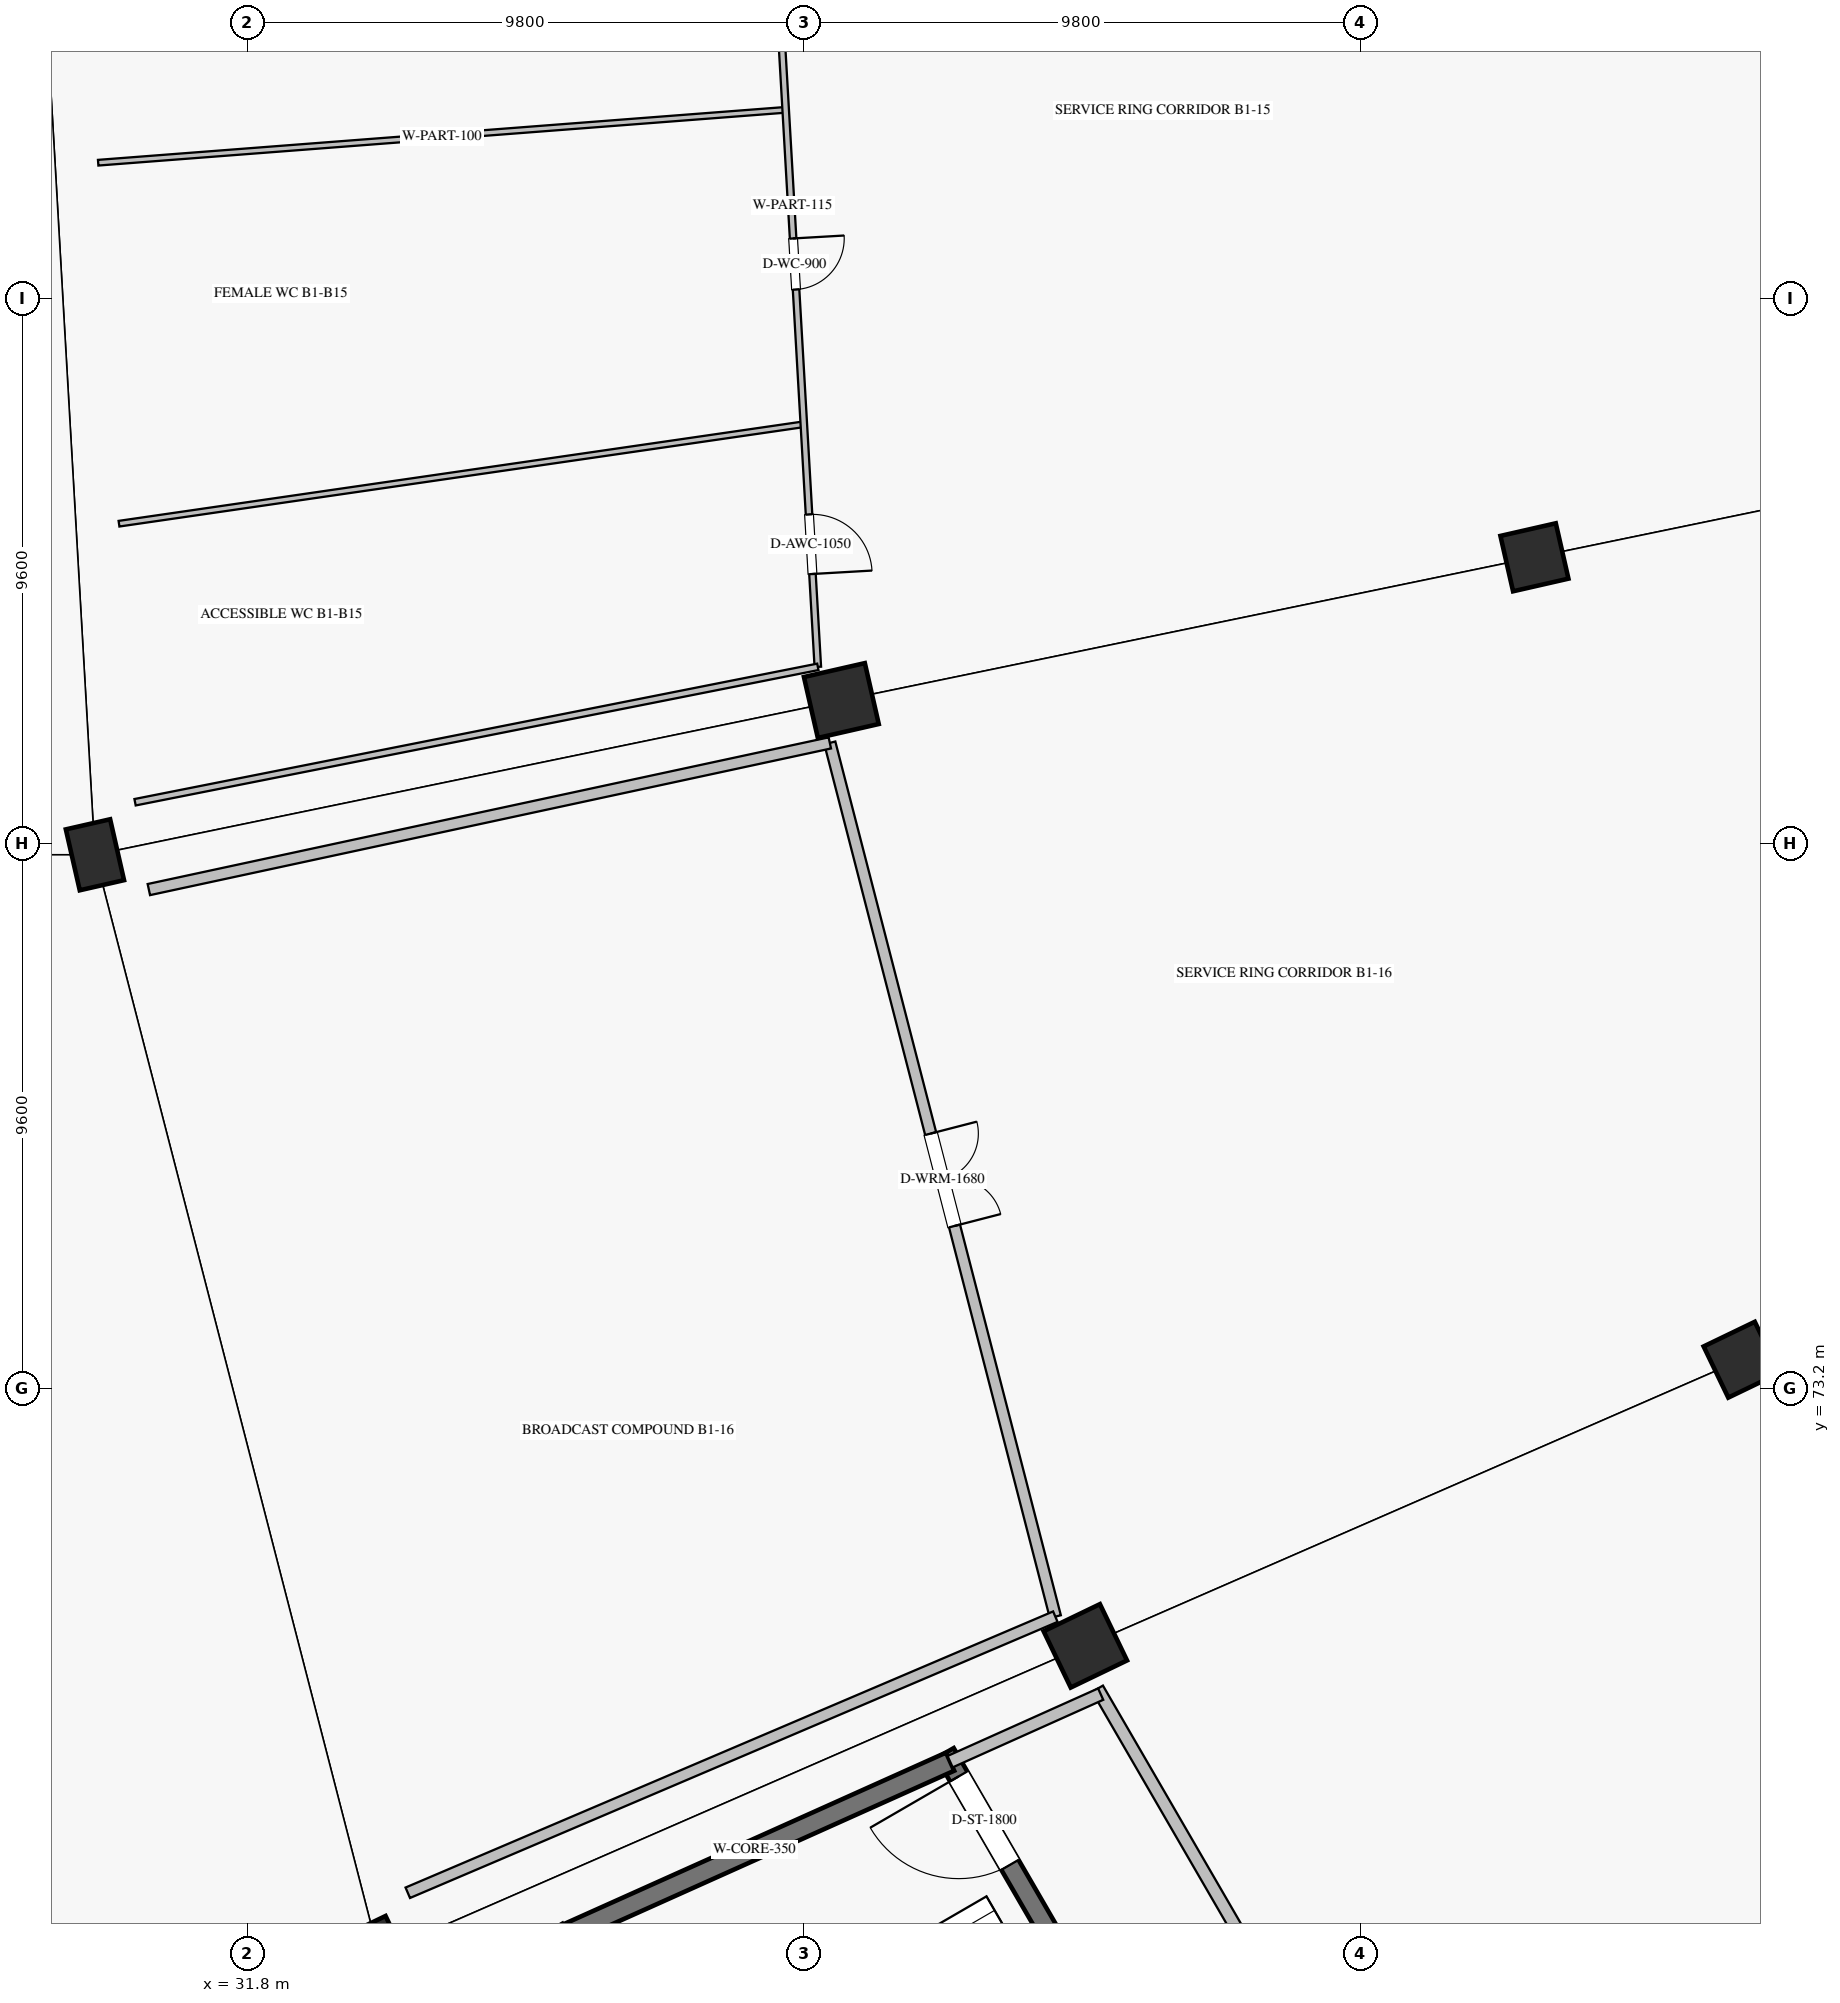
"""IFC4 building model, lengths in metres.
Left out: names, types, materials, properties, quantities, classifications, styles, units other than length and angle.
Written with IfcOpenShell. Run it as: python <this file> out.ifc"""

import sys

from ifc_helpers import new_model, si_unit, direction, frame, frame_2d, origin, origin_2d, place, context, subcontext, project, spatial, rectangle, extrude, element, fill, save


model = new_model("IFC4")
c1 = context("Model", 3, precision=1e-05, world=origin(), true_north=direction((0.0, 1.0)))
c2 = subcontext(c1, "Body", "Model", "MODEL_VIEW")
j1 = project(units=[si_unit("LENGTHUNIT", "METRE"), si_unit("PLANEANGLEUNIT", "RADIAN")], contexts=[c1])
p1 = place(None, origin())
s1 = spatial("IfcSite", under=j1, at=p1, CompositionType="ELEMENT")
p2 = place(p1, origin())
s2 = spatial("IfcBuilding", under=s1, at=p2, CompositionType="ELEMENT")
p3 = place(p2, frame((0.0, 0.0, -5.44)))
s3 = spatial("IfcBuildingStorey", under=s2, at=p3, CompositionType="ELEMENT", Elevation=-5.44)
for number, where, z_axis, x_axis in (
    (1, (54.467, 87.84, 0.0), (0.0, 0.0, 1.0), (-0.975, -0.223, 0.0)),
    (2, (58.114, 73.713, 0.0), (0.0, 0.0, 1.0), (-0.901, -0.434, 0.0)),
):
    element("IfcColumn", number, at=place(p3, frame(where, z_axis=z_axis, x_axis=x_axis)), inside=s3, PredefinedType="COLUMN", context=c2, shape_type="SweptSolid", body=[
        extrude(rectangle(XDim=1.0, YDim=1.0, at=origin_2d()), origin(), (0.0, 0.0, 1.0), 5.44),
    ])
for number, where, z_axis, x_axis in (
    (3, (42.262, 85.318, 0.0), (0.0, 0.0, 1.0), (-0.975, -0.223, 0.0)),
    (4, (46.559, 68.675, 0.0), (0.0, 0.0, 1.0), (-0.901, -0.434, 0.0)),
):
    element("IfcColumn", number, at=place(p3, frame(where, z_axis=z_axis, x_axis=x_axis)), inside=s3, PredefinedType="COLUMN", context=c2, shape_type="SweptSolid", body=[
        extrude(rectangle(XDim=1.1, YDim=1.1, at=origin_2d()), origin(), (0.0, 0.0, 1.0), 5.44),
    ])
for number, where, z_axis, x_axis in (
    (5, (29.119, 82.602, 0.0), (0.0, 0.0, 1.0), (-0.975, -0.223, 0.0)),
    (6, (34.115, 63.25, 0.0), (0.0, 0.0, 1.0), (-0.901, -0.434, 0.0)),
):
    element("IfcColumn", number, at=place(p3, frame(where, z_axis=z_axis, x_axis=x_axis)), inside=s3, PredefinedType="COLUMN", context=c2, shape_type="SweptSolid", body=[
        extrude(rectangle(XDim=0.8, YDim=1.1, at=origin_2d()), origin(), (0.0, 0.0, 1.0), 5.44),
    ])
p4 = place(p3, frame((44.09, 66.788, 0.0), z_axis=(0.0, 0.0, 1.0), x_axis=(0.501628624814, -0.865083072755, 0.0)))
e7 = element("IfcWall", 7, at=p4, inside=s3, PredefinedType="SHEAR", context=c2, shape_type="SweptSolid", body=[
    extrude(rectangle(XDim=11.435, YDim=0.35, at=frame_2d((5.718, 0.0))), origin(), (0.0, 0.0, 1.0), 5.14),
])
p5 = place(p4, frame((0.475, 0.0, 0.0)))
e8 = element("IfcOpeningElement", 8, at=p5, cuts=e7, PredefinedType="OPENING", context=c2, shape_type="SweptSolid", body=[
    extrude(rectangle(XDim=1.8, YDim=2.2, at=frame_2d((0.9, 1.1))), frame((0.0, 0.185, 0.0), z_axis=(0.0, -1.0, 0.0), x_axis=(1.0, 0.0, 0.0)), (0.0, 0.0, 1.0), 0.37),
])
p6 = place(p3, frame((44.178, 66.636, 0.0), z_axis=(0.0, 0.0, 1.0), x_axis=(-0.912385324524, -0.409332407212, 0.0)))
e9 = element("IfcWall", 9, at=p6, inside=s3, PredefinedType="SHEAR", context=c2, shape_type="SweptSolid", body=[
    extrude(rectangle(XDim=7.554, YDim=0.35, at=frame_2d((3.777, 0.0))), origin(), (0.0, 0.0, 1.0), 5.14),
])
p7 = place(p3, frame((46.774, 67.921, 0.0), z_axis=(0.0, 0.0, 1.0), x_axis=(0.501612626242, -0.865092349518, 0.0)))
e10 = element("IfcWall", 10, at=p7, inside=s3, PredefinedType="SOLIDWALL", context=c2, shape_type="SweptSolid", body=[
    extrude(rectangle(XDim=16.11, YDim=0.22, at=frame_2d((8.055, 0.0))), origin(), (0.0, 0.0, 1.0), 4.088),
])
p8 = place(p7, frame((6.511, 0.0, 0.0)))
e11 = element("IfcOpeningElement", 11, at=p8, cuts=e10, PredefinedType="OPENING", context=c2, shape_type="SweptSolid", body=[
    extrude(rectangle(XDim=1.5, YDim=2.2, at=frame_2d((0.75, 1.1))), frame((0.0, 0.12, 0.0), z_axis=(0.0, -1.0, 0.0), x_axis=(1.0, 0.0, 0.0)), (0.0, 0.0, 1.0), 0.24),
])
p9 = place(p3, frame((46.829, 67.826, 0.0), z_axis=(0.0, 0.0, 1.0), x_axis=(-0.912378422162, -0.409347791949, 0.0)))
e12 = element("IfcWall", 12, at=p9, inside=s3, PredefinedType="SOLIDWALL", context=c2, shape_type="SweptSolid", body=[
    extrude(rectangle(XDim=2.906, YDim=0.22, at=frame_2d((1.453, 0.0))), origin(), (0.0, 0.0, 1.0), 5.14),
])
p10 = place(p3, frame((40.959, 101.33, 0.0), z_axis=(0.0, 0.0, 1.0), x_axis=(0.057603503798, -0.998339539611, 0.0)))
e13 = element("IfcWall", 13, at=p10, inside=s3, PredefinedType="PARTITIONING", context=c2, shape_type="SweptSolid", body=[
    extrude(rectangle(XDim=15.444, YDim=0.115, at=frame_2d((7.722, 0.0))), origin(), (0.0, 0.0, 1.0), 4.46),
])
p11 = place(p10, frame((2.33, 0.0, 0.0)))
e14 = element("IfcOpeningElement", 14, at=p11, cuts=e13, PredefinedType="OPENING", context=c2, shape_type="SweptSolid", body=[
    extrude(rectangle(XDim=0.9, YDim=2.1, at=frame_2d((0.45, 1.05))), frame((0.0, 0.067, 0.0), z_axis=(0.0, -1.0, 0.0), x_axis=(1.0, 0.0, 0.0)), (0.0, 0.0, 1.0), 0.135),
])
p12 = place(p10, frame((7.89, 0.0, 0.0)))
e15 = element("IfcOpeningElement", 15, at=p12, cuts=e13, PredefinedType="OPENING", context=c2, shape_type="SweptSolid", body=[
    extrude(rectangle(XDim=0.9, YDim=2.1, at=frame_2d((0.45, 1.05))), frame((0.0, 0.067, 0.0), z_axis=(0.0, -1.0, 0.0), x_axis=(1.0, 0.0, 0.0)), (0.0, 0.0, 1.0), 0.135),
])
p13 = place(p10, frame((12.757, 0.0, 0.0)))
e16 = element("IfcOpeningElement", 16, at=p13, cuts=e13, PredefinedType="OPENING", context=c2, shape_type="SweptSolid", body=[
    extrude(rectangle(XDim=1.05, YDim=2.1, at=frame_2d((0.525, 1.05))), frame((0.0, 0.067, 0.0), z_axis=(0.0, -1.0, 0.0), x_axis=(1.0, 0.0, 0.0)), (0.0, 0.0, 1.0), 0.135),
])
p14 = place(p3, frame((41.848, 85.911, 0.0), z_axis=(0.0, 0.0, 1.0), x_axis=(-0.980904167784, -0.194491680088, 0.0)))
e17 = element("IfcWall", 17, at=p14, inside=s3, PredefinedType="PARTITIONING", context=c2, shape_type="SweptSolid", body=[
    extrude(rectangle(XDim=12.257, YDim=0.115, at=frame_2d((6.128, 0.0))), origin(), (0.0, 0.0, 1.0), 4.46),
])
p15 = place(p3, frame((41.282, 95.717, 0.0), z_axis=(0.0, 0.0, 1.0), x_axis=(-0.997058150978, -0.076648832789, 0.0)))
e18 = element("IfcWall", 18, at=p15, inside=s3, PredefinedType="PARTITIONING", context=c2, shape_type="SweptSolid", body=[
    extrude(rectangle(XDim=12.142, YDim=0.1, at=frame_2d((6.071, 0.0))), origin(), (0.0, 0.0, 1.0), 4.46),
])
p16 = place(p3, frame((41.602, 90.182, 0.0), z_axis=(0.0, 0.0, 1.0), x_axis=(-0.989621901332, -0.143695832939, 0.0)))
e19 = element("IfcWall", 19, at=p16, inside=s3, PredefinedType="PARTITIONING", context=c2, shape_type="SweptSolid", body=[
    extrude(rectangle(XDim=12.185, YDim=0.1, at=frame_2d((6.093, 0.0))), origin(), (0.0, 0.0, 1.0), 4.46),
])
p17 = place(p3, frame((42.06, 84.572, 0.0), z_axis=(0.0, 0.0, 1.0), x_axis=(0.249970043824, -0.968253570709, 0.0)))
e20 = element("IfcWall", 20, at=p17, inside=s3, PredefinedType="PARTITIONING", context=c2, shape_type="SweptSolid", body=[
    extrude(rectangle(XDim=15.887, YDim=0.2, at=frame_2d((7.943, 0.0))), origin(), (0.0, 0.0, 1.0), 4.46),
])
p18 = place(p17, frame((7.103, 0.0, 0.0)))
e21 = element("IfcOpeningElement", 21, at=p18, cuts=e20, PredefinedType="OPENING", context=c2, shape_type="SweptSolid", body=[
    extrude(rectangle(XDim=1.68, YDim=2.3, at=frame_2d((0.84, 1.15))), frame((0.0, 0.11, 0.0), z_axis=(0.0, -1.0, 0.0), x_axis=(1.0, 0.0, 0.0)), (0.0, 0.0, 1.0), 0.22),
])
p19 = place(p3, frame((42.06, 84.572, 0.0), z_axis=(0.0, 0.0, 1.0), x_axis=(-0.97759337709, -0.210502230558, 0.0)))
e22 = element("IfcWall", 22, at=p19, inside=s3, PredefinedType="PARTITIONING", context=c2, shape_type="SweptSolid", body=[
    extrude(rectangle(XDim=12.266, YDim=0.2, at=frame_2d((6.133, 0.0))), origin(), (0.0, 0.0, 1.0), 4.46),
])
p20 = place(p3, frame((46.031, 69.189, 0.0), z_axis=(0.0, 0.0, 1.0), x_axis=(-0.919905328402, -0.392140519173, 0.0)))
e23 = element("IfcWall", 23, at=p20, inside=s3, PredefinedType="PARTITIONING", context=c2, shape_type="SweptSolid", body=[
    extrude(rectangle(XDim=12.396, YDim=0.2, at=frame_2d((6.198, 0.0))), origin(), (0.0, 0.0, 1.0), 4.46),
])
p21 = place(p5, frame((1.8, 0.0, 0.0), z_axis=(0.0, 0.0, 1.0), x_axis=(-1.0, 0.0, 0.0)))
e24 = element("IfcDoor", 24, at=p21, inside=s3, OperationType="SINGLE_SWING_RIGHT", PredefinedType="DOOR", context=c2, shape_type="SweptSolid", body=[
    extrude(rectangle(XDim=1.8, YDim=2.2, at=frame_2d((0.9, 1.1))), frame((0.0, 0.025, 0.0), z_axis=(0.0, -1.0, 0.0), x_axis=(1.0, 0.0, 0.0)), (0.0, 0.0, 1.0), 0.05),
])
fill(e8, e24)
p22 = place(p12, origin())
e25 = element("IfcDoor", 25, at=p22, inside=s3, OperationType="SINGLE_SWING_LEFT", PredefinedType="DOOR", context=c2, shape_type="SweptSolid", body=[
    extrude(rectangle(XDim=0.9, YDim=2.1, at=frame_2d((0.45, 1.05))), frame((0.0, 0.025, 0.0), z_axis=(0.0, -1.0, 0.0), x_axis=(1.0, 0.0, 0.0)), (0.0, 0.0, 1.0), 0.05),
])
fill(e15, e25)
p23 = place(p13, origin())
e26 = element("IfcDoor", 26, at=p23, inside=s3, OperationType="SINGLE_SWING_RIGHT", PredefinedType="DOOR", context=c2, shape_type="SweptSolid", body=[
    extrude(rectangle(XDim=1.05, YDim=2.1, at=frame_2d((0.525, 1.05))), frame((0.0, 0.025, 0.0), z_axis=(0.0, -1.0, 0.0), x_axis=(1.0, 0.0, 0.0)), (0.0, 0.0, 1.0), 0.05),
])
fill(e16, e26)
p24 = place(p18, origin())
e27 = element("IfcDoor", 27, at=p24, inside=s3, OperationType="DOUBLE_DOOR_SINGLE_SWING", PredefinedType="DOOR", context=c2, shape_type="SweptSolid", body=[
    extrude(rectangle(XDim=1.68, YDim=2.3, at=frame_2d((0.84, 1.15))), frame((0.0, 0.025, 0.0), z_axis=(0.0, -1.0, 0.0), x_axis=(1.0, 0.0, 0.0)), (0.0, 0.0, 1.0), 0.05),
])
fill(e21, e27)
save(model, sys.argv[1])
